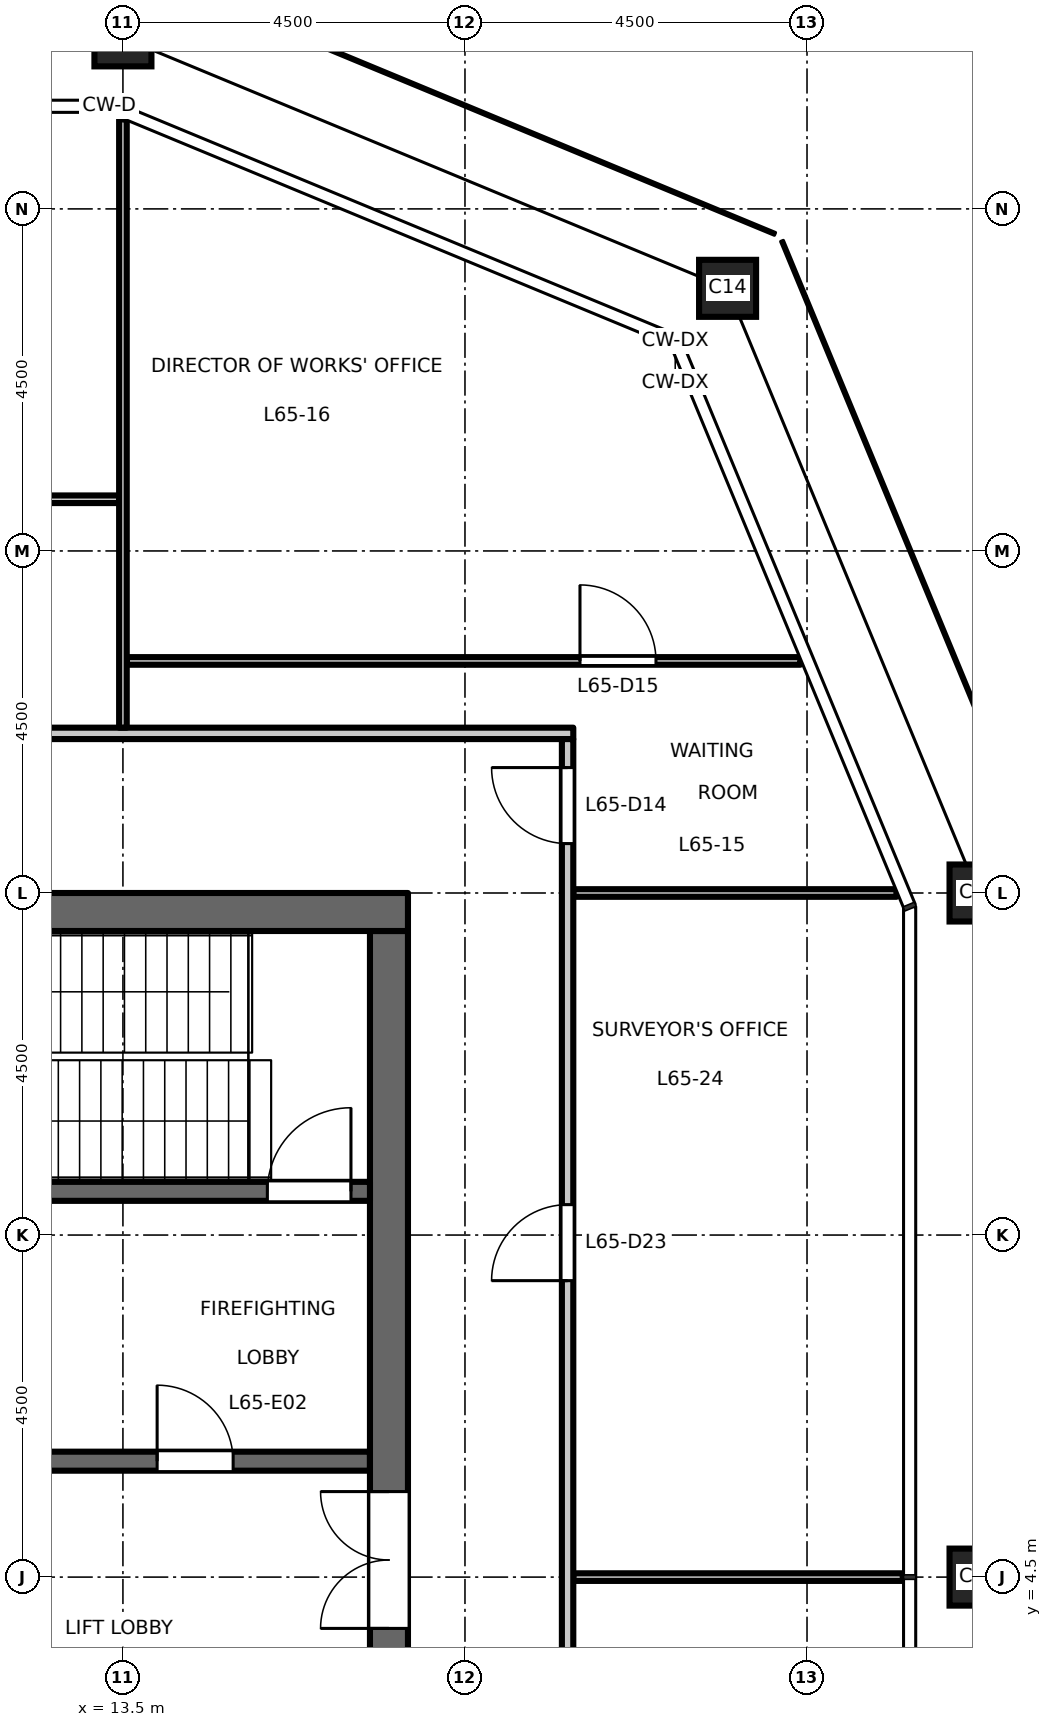
"""IFC4 building model, lengths in metres.
Left out: names, types, materials, properties, quantities, classifications, styles, units other than length and angle.
Written with IfcOpenShell. Run it as: python <this file> out.ifc"""

import sys

from ifc_helpers import new_model, si_unit, direction, frame, frame_2d, origin, origin_2d, place, context, subcontext, project, spatial, rectangle, hollow_rectangle, extrude, element, fill, save


model = new_model("IFC4")
c1 = context("Model", 3, precision=1e-05, world=origin(), true_north=direction((0.0, 1.0)))
c2 = subcontext(c1, "Body", "Model", "MODEL_VIEW")
j1 = project(units=[si_unit("LENGTHUNIT", "METRE"), si_unit("PLANEANGLEUNIT", "RADIAN")], contexts=[c1])
p1 = place(None, origin())
s1 = spatial("IfcSite", under=j1, at=p1, CompositionType="ELEMENT")
p2 = place(p1, origin())
s2 = spatial("IfcBuilding", under=s1, at=p2, CompositionType="ELEMENT")
p3 = place(p2, frame((0.0, 0.0, 303.2)))
s3 = spatial("IfcBuildingStorey", under=s2, at=p3, CompositionType="ELEMENT", Elevation=303.2)
for number, where, z_axis, x_axis in (
    (1, (24.75, 4.5, 0.0), (0.0, 0.0, 1.0), (1.0, 0.0, 0.0)),
    (2, (24.75, 13.5, 0.0), (0.0, 0.0, 1.0), (1.0, 0.0, 0.0)),
    (3, (21.455, 21.455, 0.0), (0.0, 0.0, 1.0), (1.0, 0.0, 0.0)),
    (4, (13.5, 24.75, 0.0), (0.0, 0.0, 1.0), (1.0, 0.0, 0.0)),
):
    element("IfcColumn", number, at=place(p3, frame(where, z_axis=z_axis, x_axis=x_axis)), inside=s3, PredefinedType="COLUMN", context=c2, shape_type="SweptSolid", body=[
        extrude(hollow_rectangle(XDim=0.75, YDim=0.75, WallThickness=0.04, at=origin_2d()), origin(), (0.0, 0.0, 1.0), 4.5),
    ])
p4 = place(p3, frame((12.15, 6.025, 0.0), z_axis=(0.0, 0.0, 1.0), x_axis=(1.0, 0.0, 0.0)))
e5 = element("IfcWall", 5, at=p4, inside=s3, PredefinedType="SHEAR", context=c2, shape_type="SweptSolid", body=[
    extrude(rectangle(XDim=4.6, YDim=0.25, at=frame_2d((2.3, 0.0))), origin(), (0.0, 0.0, 1.0), 4.35),
])
p5 = place(p4, frame((1.8, 0.0, 0.0)))
e6 = element("IfcOpeningElement", 6, at=p5, cuts=e5, PredefinedType="OPENING", context=c2, shape_type="SweptSolid", body=[
    extrude(rectangle(XDim=1.0, YDim=2.1, at=frame_2d((0.5, 1.05))), frame((0.0, 0.135, 0.0), z_axis=(0.0, -1.0, 0.0), x_axis=(1.0, 0.0, 0.0)), (0.0, 0.0, 1.0), 0.27),
])
p6 = place(p3, frame((17.0, -13.0, 0.0), z_axis=(0.0, 0.0, 1.0), x_axis=(0.0, 1.0, 0.0)))
e7 = element("IfcWall", 7, at=p6, inside=s3, PredefinedType="SHEAR", context=c2, shape_type="SweptSolid", body=[
    extrude(rectangle(XDim=26.0, YDim=0.5, at=frame_2d((13.0, 0.0))), origin(), (0.0, 0.0, 1.0), 4.35),
])
p7 = place(p6, frame((16.825, 0.0, 0.0)))
e8 = element("IfcOpeningElement", 8, at=p7, cuts=e7, PredefinedType="OPENING", context=c2, shape_type="SweptSolid", body=[
    extrude(rectangle(XDim=1.8, YDim=2.1, at=frame_2d((0.9, 1.05))), frame((0.0, 0.26, 0.0), z_axis=(0.0, -1.0, 0.0), x_axis=(1.0, 0.0, 0.0)), (0.0, 0.0, 1.0), 0.52),
])
p8 = place(p6, frame((7.375, 0.0, 0.0)))
e9 = element("IfcOpeningElement", 9, at=p8, cuts=e7, PredefinedType="OPENING", context=c2, shape_type="SweptSolid", body=[
    extrude(rectangle(XDim=1.8, YDim=2.1, at=frame_2d((0.9, 1.05))), frame((0.0, 0.26, 0.0), z_axis=(0.0, -1.0, 0.0), x_axis=(1.0, 0.0, 0.0)), (0.0, 0.0, 1.0), 0.52),
])
p9 = place(p3, frame((8.75, 9.575, 0.0), z_axis=(0.0, 0.0, 1.0), x_axis=(1.0, 0.0, 0.0)))
e10 = element("IfcWall", 10, at=p9, inside=s3, PredefinedType="SHEAR", context=c2, shape_type="SweptSolid", body=[
    extrude(rectangle(XDim=8.0, YDim=0.25, at=frame_2d((4.0, 0.0))), origin(), (0.0, 0.0, 1.0), 4.35),
])
p10 = place(p9, frame((6.65, 0.0, 0.0)))
e11 = element("IfcOpeningElement", 11, at=p10, cuts=e10, PredefinedType="OPENING", context=c2, shape_type="SweptSolid", body=[
    extrude(rectangle(XDim=1.1, YDim=2.1, at=frame_2d((0.55, 1.05))), frame((0.0, 0.135, 0.0), z_axis=(0.0, -1.0, 0.0), x_axis=(1.0, 0.0, 0.0)), (0.0, 0.0, 1.0), 0.27),
])
p11 = place(p3, frame((8.25, 13.25, 0.0), z_axis=(0.0, 0.0, 1.0), x_axis=(1.0, 0.0, 0.0)))
e12 = element("IfcWall", 12, at=p11, inside=s3, PredefinedType="SHEAR", context=c2, shape_type="SweptSolid", body=[
    extrude(rectangle(XDim=9.0, YDim=0.5, at=frame_2d((4.5, 0.0))), origin(), (0.0, 0.0, 1.0), 4.35),
])
p12 = place(p3, frame((19.425, 4.5, 0.0), z_axis=(0.0, 0.0, 1.0), x_axis=(1.0, 0.0, 0.0)))
e13 = element("IfcWall", 13, at=p12, inside=s3, PredefinedType="PARTITIONING", context=c2, shape_type="SweptSolid", body=[
    extrude(rectangle(XDim=4.335, YDim=0.1, at=frame_2d((2.167, 0.0))), origin(), (0.0, 0.0, 1.0), 4.35),
])
p13 = place(p3, frame((19.425, 13.5, 0.0), z_axis=(0.0, 0.0, 1.0), x_axis=(1.0, 0.0, 0.0)))
e14 = element("IfcWall", 14, at=p13, inside=s3, PredefinedType="PARTITIONING", context=c2, shape_type="SweptSolid", body=[
    extrude(rectangle(XDim=4.253, YDim=0.1, at=frame_2d((2.126, 0.0))), origin(), (0.0, 0.0, 1.0), 4.35),
])
p14 = place(p3, frame((-19.425, 15.6, 0.0), z_axis=(0.0, 0.0, 1.0), x_axis=(1.0, 0.0, 0.0)))
e15 = element("IfcWall", 15, at=p14, inside=s3, PredefinedType="PARTITIONING", context=c2, shape_type="SweptSolid", body=[
    extrude(rectangle(XDim=38.85, YDim=0.15, at=frame_2d((19.425, 0.0))), origin(), (0.0, 0.0, 1.0), 4.35),
])
p15 = place(p14, frame((10.025, 0.0, 0.0)))
e16 = element("IfcOpeningElement", 16, at=p15, cuts=e15, PredefinedType="OPENING", context=c2, shape_type="SweptSolid", body=[
    extrude(rectangle(XDim=1.0, YDim=2.1, at=frame_2d((0.5, 1.05))), frame((0.0, 0.085, 0.0), z_axis=(0.0, -1.0, 0.0), x_axis=(1.0, 0.0, 0.0)), (0.0, 0.0, 1.0), 0.17),
])
p16 = place(p14, frame((19.025, 0.0, 0.0)))
e17 = element("IfcOpeningElement", 17, at=p16, cuts=e15, PredefinedType="OPENING", context=c2, shape_type="SweptSolid", body=[
    extrude(rectangle(XDim=1.0, YDim=2.1, at=frame_2d((0.5, 1.05))), frame((0.0, 0.085, 0.0), z_axis=(0.0, -1.0, 0.0), x_axis=(1.0, 0.0, 0.0)), (0.0, 0.0, 1.0), 0.17),
])
p17 = place(p14, frame((28.025, 0.0, 0.0)))
e18 = element("IfcOpeningElement", 18, at=p17, cuts=e15, PredefinedType="OPENING", context=c2, shape_type="SweptSolid", body=[
    extrude(rectangle(XDim=1.0, YDim=2.1, at=frame_2d((0.5, 1.05))), frame((0.0, 0.085, 0.0), z_axis=(0.0, -1.0, 0.0), x_axis=(1.0, 0.0, 0.0)), (0.0, 0.0, 1.0), 0.17),
])
p18 = place(p3, frame((13.55, 16.553, 0.0), z_axis=(0.0, 0.0, 1.0), x_axis=(1.0, 0.0, 0.0)))
e19 = element("IfcWall", 19, at=p18, inside=s3, PredefinedType="PARTITIONING", context=c2, shape_type="SweptSolid", body=[
    extrude(rectangle(XDim=8.863, YDim=0.1, at=frame_2d((4.432, 0.0))), origin(), (0.0, 0.0, 1.0), 4.35),
])
p19 = place(p18, frame((5.963, 0.0, 0.0)))
e20 = element("IfcOpeningElement", 20, at=p19, cuts=e19, PredefinedType="OPENING", context=c2, shape_type="SweptSolid", body=[
    extrude(rectangle(XDim=1.0, YDim=2.1, at=frame_2d((0.5, 1.05))), frame((0.0, 0.06, 0.0), z_axis=(0.0, -1.0, 0.0), x_axis=(1.0, 0.0, 0.0)), (0.0, 0.0, 1.0), 0.12),
])
p20 = place(p3, frame((4.55, 18.68, 0.0), z_axis=(0.0, 0.0, 1.0), x_axis=(1.0, 0.0, 0.0)))
e21 = element("IfcWall", 21, at=p20, inside=s3, PredefinedType="PARTITIONING", context=c2, shape_type="SweptSolid", body=[
    extrude(rectangle(XDim=8.9, YDim=0.1, at=frame_2d((4.45, 0.0))), origin(), (0.0, 0.0, 1.0), 4.35),
])
p21 = place(p20, frame((4.05, 0.0, 0.0)))
e22 = element("IfcOpeningElement", 22, at=p21, cuts=e21, PredefinedType="OPENING", context=c2, shape_type="SweptSolid", body=[
    extrude(rectangle(XDim=1.0, YDim=2.1, at=frame_2d((0.5, 1.05))), frame((0.0, 0.06, 0.0), z_axis=(0.0, -1.0, 0.0), x_axis=(1.0, 0.0, 0.0)), (0.0, 0.0, 1.0), 0.12),
])
p22 = place(p3, frame((13.5, 15.675, 0.0), z_axis=(0.0, 0.0, 1.0), x_axis=(0.0, 1.0, 0.0)))
e23 = element("IfcWall", 23, at=p22, inside=s3, PredefinedType="PARTITIONING", context=c2, shape_type="SweptSolid", body=[
    extrude(rectangle(XDim=8.003, YDim=0.1, at=frame_2d((4.001, 0.0))), origin(), (0.0, 0.0, 1.0), 3.75),
])
p23 = place(p3, frame((19.35, -15.525, 0.0), z_axis=(0.0, 0.0, 1.0), x_axis=(0.0, 1.0, 0.0)))
e24 = element("IfcWall", 24, at=p23, inside=s3, PredefinedType="PARTITIONING", context=c2, shape_type="SweptSolid", body=[
    extrude(rectangle(XDim=31.05, YDim=0.15, at=frame_2d((15.525, 0.0))), origin(), (0.0, 0.0, 1.0), 4.35),
])
p24 = place(p23, frame((29.675, 0.0, 0.0)))
e25 = element("IfcOpeningElement", 25, at=p24, cuts=e24, PredefinedType="OPENING", context=c2, shape_type="SweptSolid", body=[
    extrude(rectangle(XDim=1.0, YDim=2.1, at=frame_2d((0.5, 1.05))), frame((0.0, 0.085, 0.0), z_axis=(0.0, -1.0, 0.0), x_axis=(1.0, 0.0, 0.0)), (0.0, 0.0, 1.0), 0.17),
])
p25 = place(p23, frame((5.925, 0.0, 0.0)))
e26 = element("IfcOpeningElement", 26, at=p25, cuts=e24, PredefinedType="OPENING", context=c2, shape_type="SweptSolid", body=[
    extrude(rectangle(XDim=1.0, YDim=2.1, at=frame_2d((0.5, 1.05))), frame((0.0, 0.085, 0.0), z_axis=(0.0, -1.0, 0.0), x_axis=(1.0, 0.0, 0.0)), (0.0, 0.0, 1.0), 0.17),
])
p26 = place(p23, frame((14.925, 0.0, 0.0)))
e27 = element("IfcOpeningElement", 27, at=p26, cuts=e24, PredefinedType="OPENING", context=c2, shape_type="SweptSolid", body=[
    extrude(rectangle(XDim=1.0, YDim=2.1, at=frame_2d((0.5, 1.05))), frame((0.0, 0.085, 0.0), z_axis=(0.0, -1.0, 0.0), x_axis=(1.0, 0.0, 0.0)), (0.0, 0.0, 1.0), 0.17),
])
p27 = place(p23, frame((23.925, 0.0, 0.0)))
e28 = element("IfcOpeningElement", 28, at=p27, cuts=e24, PredefinedType="OPENING", context=c2, shape_type="SweptSolid", body=[
    extrude(rectangle(XDim=1.0, YDim=2.1, at=frame_2d((0.5, 1.05))), frame((0.0, 0.085, 0.0), z_axis=(0.0, -1.0, 0.0), x_axis=(1.0, 0.0, 0.0)), (0.0, 0.0, 1.0), 0.17),
])
p28 = place(p5, origin())
e29 = element("IfcDoor", 29, at=p28, inside=s3, OperationType="SINGLE_SWING_RIGHT", PredefinedType="DOOR", context=c2, shape_type="SweptSolid", body=[
    extrude(rectangle(XDim=1.0, YDim=2.1, at=frame_2d((0.5, 1.05))), frame((0.0, 0.025, 0.0), z_axis=(0.0, -1.0, 0.0), x_axis=(1.0, 0.0, 0.0)), (0.0, 0.0, 1.0), 0.05),
])
fill(e6, e29)
p29 = place(p10, origin())
e30 = element("IfcDoor", 30, at=p29, inside=s3, OperationType="SINGLE_SWING_LEFT", PredefinedType="DOOR", context=c2, shape_type="SweptSolid", body=[
    extrude(rectangle(XDim=1.1, YDim=2.1, at=frame_2d((0.55, 1.05))), frame((0.0, 0.025, 0.0), z_axis=(0.0, -1.0, 0.0), x_axis=(1.0, 0.0, 0.0)), (0.0, 0.0, 1.0), 0.05),
])
fill(e11, e30)
p30 = place(p7, origin())
e31 = element("IfcDoor", 31, at=p30, inside=s3, OperationType="DOUBLE_DOOR_DOUBLE_SWING", PredefinedType="DOOR", context=c2, shape_type="SweptSolid", body=[
    extrude(rectangle(XDim=1.8, YDim=2.1, at=frame_2d((0.9, 1.05))), frame((0.0, 0.025, 0.0), z_axis=(0.0, -1.0, 0.0), x_axis=(1.0, 0.0, 0.0)), (0.0, 0.0, 1.0), 0.05),
])
fill(e8, e31)
p31 = place(p24, origin())
e32 = element("IfcDoor", 32, at=p31, inside=s3, OperationType="SINGLE_SWING_RIGHT", PredefinedType="DOOR", context=c2, shape_type="SweptSolid", body=[
    extrude(rectangle(XDim=1.0, YDim=2.1, at=frame_2d((0.5, 1.05))), frame((0.0, 0.025, 0.0), z_axis=(0.0, -1.0, 0.0), x_axis=(1.0, 0.0, 0.0)), (0.0, 0.0, 1.0), 0.05),
])
fill(e25, e32)
p32 = place(p19, origin())
e33 = element("IfcDoor", 33, at=p32, inside=s3, OperationType="SINGLE_SWING_LEFT", PredefinedType="DOOR", context=c2, shape_type="SweptSolid", body=[
    extrude(rectangle(XDim=1.0, YDim=2.1, at=frame_2d((0.5, 1.05))), frame((0.0, 0.025, 0.0), z_axis=(0.0, -1.0, 0.0), x_axis=(1.0, 0.0, 0.0)), (0.0, 0.0, 1.0), 0.05),
])
fill(e20, e33)
p33 = place(p27, origin())
e34 = element("IfcDoor", 34, at=p33, inside=s3, OperationType="SINGLE_SWING_LEFT", PredefinedType="DOOR", context=c2, shape_type="SweptSolid", body=[
    extrude(rectangle(XDim=1.0, YDim=2.1, at=frame_2d((0.5, 1.05))), frame((0.0, 0.025, 0.0), z_axis=(0.0, -1.0, 0.0), x_axis=(1.0, 0.0, 0.0)), (0.0, 0.0, 1.0), 0.05),
])
fill(e28, e34)
save(model, sys.argv[1])
